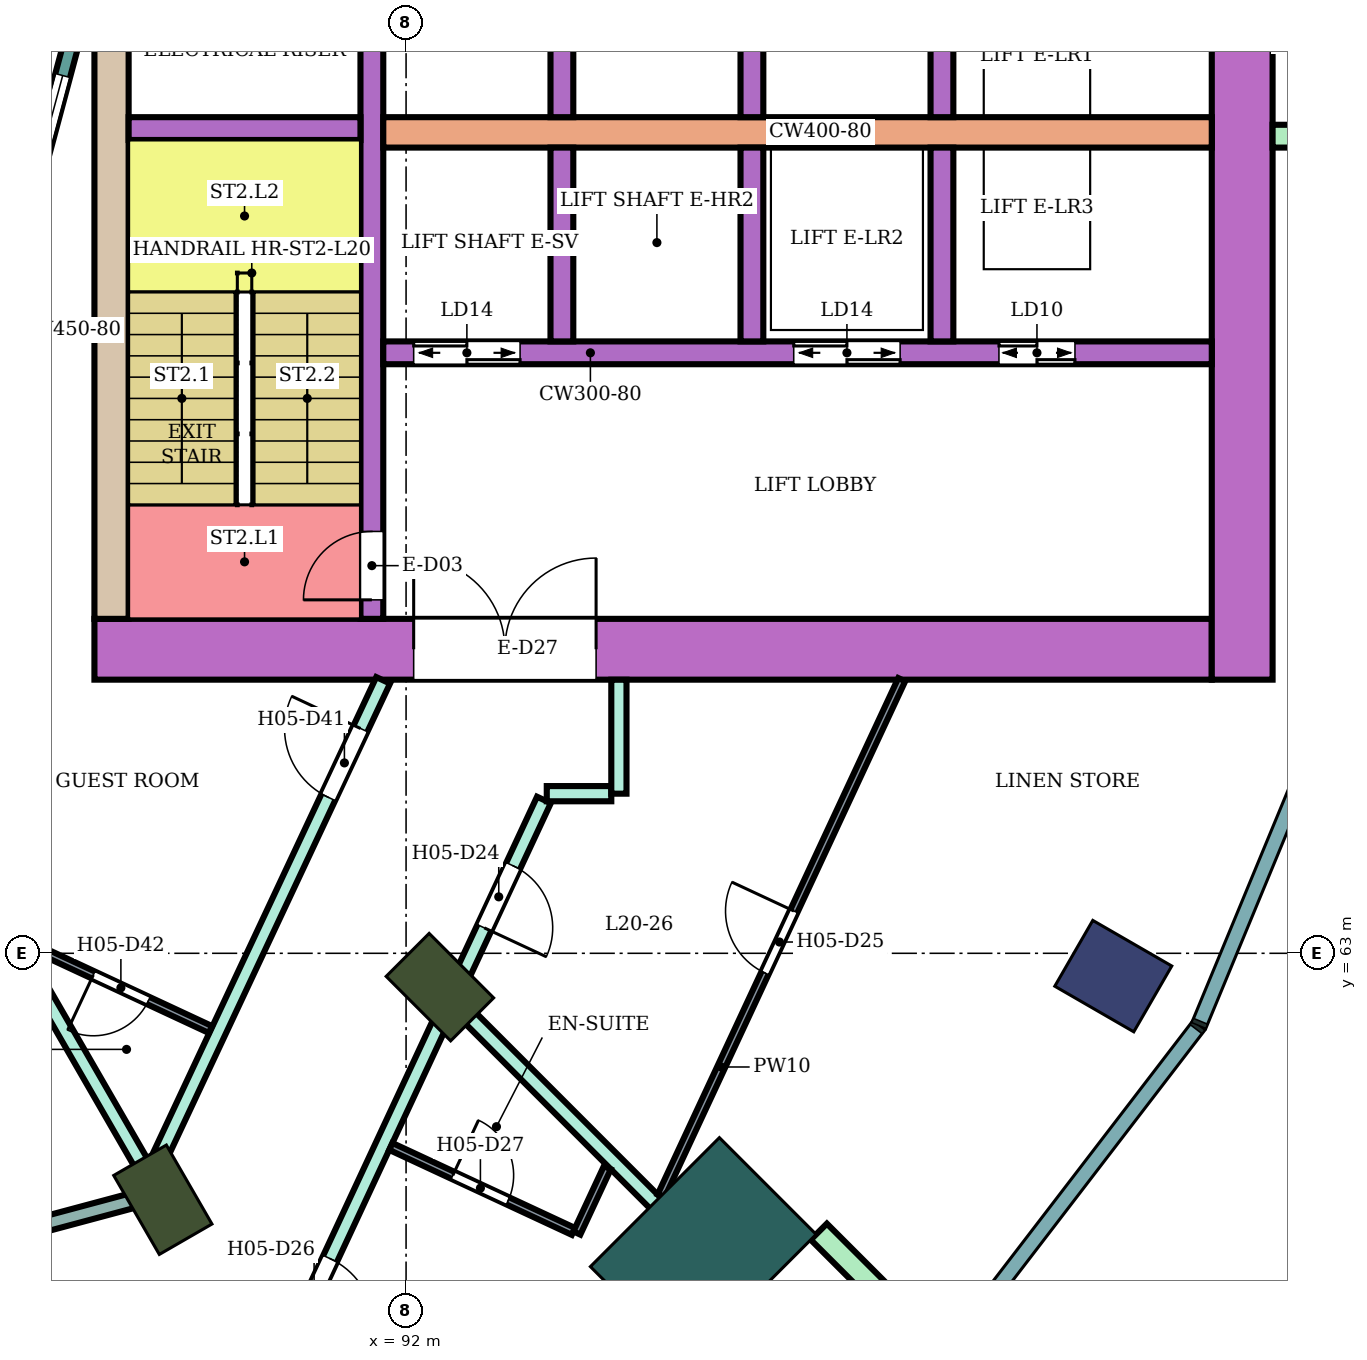
"""IFC4 building model, lengths in metres.
Left out: names, types, materials, properties, quantities, classifications, styles, units other than length and angle.
Written with IfcOpenShell. Run it as: python <this file> out.ifc"""

import sys

from ifc_helpers import new_model, si_unit, direction, frame, frame_2d, origin, origin_2d, place, context, subcontext, project, spatial, rectangle, extrude, element, fill, save


model = new_model("IFC4")
c1 = context("Model", 3, precision=1e-05, world=origin(), true_north=direction((0.0, 1.0)))
c2 = subcontext(c1, "Body", "Model", "MODEL_VIEW")
j1 = project(units=[si_unit("LENGTHUNIT", "METRE"), si_unit("PLANEANGLEUNIT", "RADIAN")], contexts=[c1])
p1 = place(None, origin())
s1 = spatial("IfcSite", under=j1, at=p1, CompositionType="ELEMENT")
p2 = place(p1, origin())
s2 = spatial("IfcBuilding", under=s1, at=p2, CompositionType="ELEMENT")
p3 = place(p2, frame((0.0, 0.0, 90.0)))
s3 = spatial("IfcBuildingStorey", under=s2, at=p3, CompositionType="ELEMENT", Elevation=90.0)
p4 = place(p3, frame((101.304, 62.7, 0.0), z_axis=(0.0, 0.0, 1.0), x_axis=(0.866025403784, -0.5, 0.0)))
e1 = element("IfcColumn", 1, at=p4, inside=s3, PredefinedType="COLUMN", context=c2, shape_type="SweptSolid", body=[
    extrude(rectangle(XDim=1.2, YDim=1.0, at=origin_2d()), origin(), (0.0, 0.0, 1.0), 3.8),
])
for number, where, z_axis, x_axis in (
    (2, (88.8, 59.758, 0.0), (0.0, 0.0, 1.0), (0.5, -0.866, 0.0)),
    (3, (92.445, 62.555, 0.0), (0.0, 0.0, 1.0), (0.707, -0.707, 0.0)),
):
    element("IfcColumn", number, at=place(p3, frame(where, z_axis=z_axis, x_axis=x_axis)), inside=s3, PredefinedType="COLUMN", context=c2, shape_type="SweptSolid", body=[
        extrude(rectangle(XDim=1.2, YDim=0.8, at=origin_2d()), origin(), (0.0, 0.0, 1.0), 3.8),
    ])
p5 = place(p3, frame((95.91, 59.09, 0.0), z_axis=(0.0, 0.0, 1.0), x_axis=(0.707106781187, -0.707106781187, 0.0)))
e4 = element("IfcColumn", 4, at=p5, inside=s3, PredefinedType="COLUMN", context=c2, shape_type="SweptSolid", body=[
    extrude(rectangle(XDim=1.8, YDim=2.4, at=origin_2d()), origin(), (0.0, 0.0, 1.0), 3.8),
])
p6 = place(p3, frame((87.9, 67.0, 0.0), z_axis=(0.0, 0.0, 1.0), x_axis=(1.0, 0.0, 0.0)))
e5 = element("IfcWall", 5, at=p6, inside=s3, PredefinedType="SHEAR", context=c2, shape_type="SweptSolid", body=[
    extrude(rectangle(XDim=14.7, YDim=0.8, at=frame_2d((7.35, 0.0))), origin(), (0.0, 0.0, 1.0), 3.48),
])
p7 = place(p6, frame((4.2, 0.0, 0.0)))
e6 = element("IfcOpeningElement", 6, at=p7, cuts=e5, PredefinedType="OPENING", context=c2, shape_type="SweptSolid", body=[
    extrude(rectangle(XDim=2.4, YDim=2.4, at=frame_2d((1.2, 1.2))), frame((0.0, 0.41, 0.0), z_axis=(0.0, -1.0, 0.0), x_axis=(1.0, 0.0, 0.0)), (0.0, 0.0, 1.0), 0.82),
])
p8 = place(p3, frame((88.125, 67.4, 0.0), z_axis=(0.0, 0.0, 1.0), x_axis=(0.0, 1.0, 0.0)))
e7 = element("IfcWall", 7, at=p8, inside=s3, PredefinedType="SHEAR", context=c2, shape_type="SweptSolid", body=[
    extrude(rectangle(XDim=7.6, YDim=0.45, at=frame_2d((3.8, 0.0))), origin(), (0.0, 0.0, 1.0), 3.48),
])
p9 = place(p3, frame((103.0, 66.6, 0.0), z_axis=(0.0, 0.0, 1.0), x_axis=(0.0, 1.0, 0.0)))
e8 = element("IfcWall", 8, at=p9, inside=s3, PredefinedType="SHEAR", context=c2, shape_type="SweptSolid", body=[
    extrude(rectangle(XDim=16.8, YDim=0.8, at=frame_2d((8.4, 0.0))), origin(), (0.0, 0.0, 1.0), 3.48),
])
p10 = place(p3, frame((91.55, 67.4, 0.0), z_axis=(0.0, 0.0, 1.0), x_axis=(0.0, 1.0, 0.0)))
e9 = element("IfcWall", 9, at=p10, inside=s3, PredefinedType="SHEAR", context=c2, shape_type="SweptSolid", body=[
    extrude(rectangle(XDim=7.6, YDim=0.3, at=frame_2d((3.8, 0.0))), origin(), (0.0, 0.0, 1.0), 3.48),
])
p11 = place(p10, frame((0.25, 0.0, 0.0)))
e10 = element("IfcOpeningElement", 10, at=p11, cuts=e9, PredefinedType="OPENING", context=c2, shape_type="SweptSolid", body=[
    extrude(rectangle(XDim=0.9, YDim=2.1, at=frame_2d((0.45, 1.05))), frame((0.0, 0.16, 0.0), z_axis=(0.0, -1.0, 0.0), x_axis=(1.0, 0.0, 0.0)), (0.0, 0.0, 1.0), 0.32),
])
p12 = place(p3, frame((88.35, 73.85, 0.0), z_axis=(0.0, 0.0, 1.0), x_axis=(1.0, 0.0, 0.0)))
e11 = element("IfcWall", 11, at=p12, inside=s3, PredefinedType="SHEAR", context=c2, shape_type="SweptSolid", body=[
    extrude(rectangle(XDim=3.05, YDim=0.3, at=frame_2d((1.525, 0.0))), origin(), (0.0, 0.0, 1.0), 3.48),
])
p13 = place(p3, frame((91.7, 73.8, 0.0), z_axis=(0.0, 0.0, 1.0), x_axis=(1.0, 0.0, 0.0)))
e12 = element("IfcWall", 12, at=p13, inside=s3, PredefinedType="SHEAR", context=c2, shape_type="SweptSolid", body=[
    extrude(rectangle(XDim=10.9, YDim=0.4, at=frame_2d((5.45, 0.0))), origin(), (0.0, 0.0, 1.0), 3.48),
])
p14 = place(p3, frame((91.7, 70.9, 0.0), z_axis=(0.0, 0.0, 1.0), x_axis=(1.0, 0.0, 0.0)))
e13 = element("IfcWall", 13, at=p14, inside=s3, PredefinedType="SHEAR", context=c2, shape_type="SweptSolid", body=[
    extrude(rectangle(XDim=10.9, YDim=0.3, at=frame_2d((5.45, 0.0))), origin(), (0.0, 0.0, 1.0), 3.48),
])
p15 = place(p14, frame((0.4, 0.0, 0.0)))
e14 = element("IfcOpeningElement", 14, at=p15, cuts=e13, PredefinedType="OPENING", context=c2, shape_type="SweptSolid", body=[
    extrude(rectangle(XDim=1.4, YDim=2.1, at=frame_2d((0.7, 1.05))), frame((0.0, 0.16, 0.0), z_axis=(0.0, -1.0, 0.0), x_axis=(1.0, 0.0, 0.0)), (0.0, 0.0, 1.0), 0.32),
])
p16 = place(p14, frame((5.4, 0.0, 0.0)))
e15 = element("IfcOpeningElement", 15, at=p16, cuts=e13, PredefinedType="OPENING", context=c2, shape_type="SweptSolid", body=[
    extrude(rectangle(XDim=1.4, YDim=2.1, at=frame_2d((0.7, 1.05))), frame((0.0, 0.16, 0.0), z_axis=(0.0, -1.0, 0.0), x_axis=(1.0, 0.0, 0.0)), (0.0, 0.0, 1.0), 0.32),
])
p17 = place(p14, frame((8.1, 0.0, 0.0)))
e16 = element("IfcOpeningElement", 16, at=p17, cuts=e13, PredefinedType="OPENING", context=c2, shape_type="SweptSolid", body=[
    extrude(rectangle(XDim=1.0, YDim=2.1, at=frame_2d((0.5, 1.05))), frame((0.0, 0.16, 0.0), z_axis=(0.0, -1.0, 0.0), x_axis=(1.0, 0.0, 0.0)), (0.0, 0.0, 1.0), 0.32),
])
for number, where, z_axis, x_axis in (
    (17, (94.05, 74.0, 0.0), (0.0, 0.0, 1.0), (0.0, 1.0, 0.0)),
    (18, (96.55, 74.0, 0.0), (0.0, 0.0, 1.0), (0.0, 1.0, 0.0)),
    (19, (99.05, 74.0, 0.0), (0.0, 0.0, 1.0), (0.0, 1.0, 0.0)),
    (20, (94.05, 71.05, 0.0), (0.0, 0.0, 1.0), (0.0, 1.0, 0.0)),
    (21, (96.55, 71.05, 0.0), (0.0, 0.0, 1.0), (0.0, 1.0, 0.0)),
    (22, (99.05, 71.05, 0.0), (0.0, 0.0, 1.0), (0.0, 1.0, 0.0)),
):
    element("IfcWall", number, at=place(p3, frame(where, z_axis=z_axis, x_axis=x_axis)), inside=s3, PredefinedType="SHEAR", context=c2, shape_type="SweptSolid", body=[
        extrude(rectangle(XDim=2.55, YDim=0.3, at=frame_2d((1.275, 0.0))), origin(), (0.0, 0.0, 1.0), 3.48),
    ])
for number, where, z_axis, x_axis in (
    (23, (103.4, 73.75, 0.0), (0.0, 0.0, 1.0), (1.0, 0.0, 0.0)),
    (24, (97.43, 59.338, 0.0), (0.0, 0.0, 1.0), (0.707, -0.707, 0.0)),
):
    element("IfcWall", number, at=place(p3, frame(where, z_axis=z_axis, x_axis=x_axis)), inside=s3, PredefinedType="NOTDEFINED", context=c2, shape_type="SweptSolid", body=[
        extrude(rectangle(XDim=2.416, YDim=0.3, at=frame_2d((1.208, 0.0))), origin(), (0.0, 0.0, 1.0), 3.8),
    ])
p18 = place(p3, frame((86.585, 71.198, 0.0), z_axis=(0.0, 0.0, 1.0), x_axis=(0.258789828301, 0.965933654434, 0.0)))
e25 = element("IfcWall", 25, at=p18, inside=s3, PredefinedType="NOTDEFINED", context=c2, shape_type="SweptSolid", body=[
    extrude(rectangle(XDim=3.936, YDim=0.2, at=frame_2d((1.968, 0.0))), origin(), (0.0, 0.0, 1.0), 3.8),
])
p19 = place(p18, frame((0.468, 0.0, 0.9)))
e26 = element("IfcOpeningElement", 26, at=p19, cuts=e25, PredefinedType="OPENING", context=c2, shape_type="SweptSolid", body=[
    extrude(rectangle(XDim=3.0, YDim=2.3, at=frame_2d((1.5, 1.15))), frame((0.0, 0.11, 0.0), z_axis=(0.0, -1.0, 0.0), x_axis=(1.0, 0.0, 0.0)), (0.0, 0.0, 1.0), 0.22),
])
p20 = place(p3, frame((80.0, 57.496, 0.0), z_axis=(0.0, 0.0, 1.0), x_axis=(0.96592471314, 0.258823199396, 0.0)))
e27 = element("IfcWall", 27, at=p20, inside=s3, PredefinedType="PARTITIONING", context=c2, shape_type="SweptSolid", body=[
    extrude(rectangle(XDim=8.732, YDim=0.2, at=frame_2d((4.366, 0.0))), origin(), (0.0, 0.0, 1.0), 2.98),
])
p21 = place(p3, frame((83.846, 68.33, 0.0), z_axis=(0.0, 0.0, 1.0), x_axis=(0.499822319857, -0.866127963163, 0.0)))
e28 = element("IfcWall", 28, at=p21, inside=s3, PredefinedType="PARTITIONING", context=c2, shape_type="SweptSolid", body=[
    extrude(rectangle(XDim=9.382, YDim=0.2, at=frame_2d((4.691, 0.0))), origin(), (0.0, 0.0, 1.0), 3.35),
])
p22 = place(p3, frame((88.501, 59.775, 0.0), z_axis=(0.0, 0.0, 1.0), x_axis=(0.424700525505, 0.905333896215, 0.0)))
e29 = element("IfcWall", 29, at=p22, inside=s3, PredefinedType="PARTITIONING", context=c2, shape_type="SweptSolid", body=[
    extrude(rectangle(XDim=7.53, YDim=0.2, at=frame_2d((3.765, 0.0))), origin(), (0.0, 0.0, 1.0), 3.35),
])
p23 = place(p22, frame((5.83, 0.0, 0.0)))
e30 = element("IfcOpeningElement", 30, at=p23, cuts=e29, PredefinedType="OPENING", context=c2, shape_type="SweptSolid", body=[
    extrude(rectangle(XDim=1.0, YDim=2.1, at=frame_2d((0.5, 1.05))), frame((0.0, 0.11, 0.0), z_axis=(0.0, -1.0, 0.0), x_axis=(1.0, 0.0, 0.0)), (0.0, 0.0, 1.0), 0.22),
])
p24 = place(p3, frame((90.346, 57.578, 0.0), z_axis=(0.0, 0.0, 1.0), x_axis=(0.422403412327, 0.906407941964, 0.0)))
e31 = element("IfcWall", 31, at=p24, inside=s3, PredefinedType="PARTITIONING", context=c2, shape_type="SweptSolid", body=[
    extrude(rectangle(XDim=8.208, YDim=0.2, at=frame_2d((4.104, 0.0))), origin(), (0.0, 0.0, 1.0), 3.35),
])
p25 = place(p24, frame((6.351, 0.0, 0.0)))
e32 = element("IfcOpeningElement", 32, at=p25, cuts=e31, PredefinedType="OPENING", context=c2, shape_type="SweptSolid", body=[
    extrude(rectangle(XDim=0.9, YDim=2.1, at=frame_2d((0.45, 1.05))), frame((0.0, 0.11, 0.0), z_axis=(0.0, -1.0, 0.0), x_axis=(1.0, 0.0, 0.0)), (0.0, 0.0, 1.0), 0.22),
])
p26 = place(p24, frame((0.55, 0.0, 0.0)))
e33 = element("IfcOpeningElement", 33, at=p26, cuts=e31, PredefinedType="OPENING", context=c2, shape_type="SweptSolid", body=[
    extrude(rectangle(XDim=1.0, YDim=2.1, at=frame_2d((0.5, 1.05))), frame((0.0, 0.11, 0.0), z_axis=(0.0, -1.0, 0.0), x_axis=(1.0, 0.0, 0.0)), (0.0, 0.0, 1.0), 0.22),
])
p27 = place(p3, frame((92.692, 62.303, 0.0), z_axis=(0.0, 0.0, 1.0), x_axis=(0.706920663731, -0.707292849667, 0.0)))
e34 = element("IfcWall", 34, at=p27, inside=s3, PredefinedType="PARTITIONING", context=c2, shape_type="SweptSolid", body=[
    extrude(rectangle(XDim=5.248, YDim=0.2, at=frame_2d((2.624, 0.0))), origin(), (0.0, 0.0, 1.0), 3.35),
])
p28 = place(p3, frame((93.851, 65.1, 0.0), z_axis=(0.0, 0.0, 1.0), x_axis=(1.0, 0.0, 0.0)))
e35 = element("IfcWall", 35, at=p28, inside=s3, PredefinedType="PARTITIONING", context=c2, shape_type="SweptSolid", body=[
    extrude(rectangle(XDim=0.849, YDim=0.2, at=frame_2d((0.424, 0.0))), origin(), (0.0, 0.0, 1.0), 3.35),
])
p29 = place(p3, frame((94.8, 65.1, 0.0), z_axis=(0.0, 0.0, 1.0), x_axis=(0.0, 1.0, 0.0)))
e36 = element("IfcWall", 36, at=p29, inside=s3, PredefinedType="PARTITIONING", context=c2, shape_type="SweptSolid", body=[
    extrude(rectangle(XDim=1.499, YDim=0.2, at=frame_2d((0.75, 0.0))), origin(), (0.0, 0.0, 1.0), 3.35),
])
p30 = place(p3, frame((87.006, 63.124, 0.0), z_axis=(0.0, 0.0, 1.0), x_axis=(0.906535604863, -0.422129360642, 0.0)))
e37 = element("IfcWall", 37, at=p30, inside=s3, PredefinedType="PARTITIONING", context=c2, shape_type="SweptSolid", body=[
    extrude(rectangle(XDim=2.67, YDim=0.1, at=frame_2d((1.335, 0.0))), origin(), (0.0, 0.0, 1.0), 3.35),
])
p31 = place(p30, frame((0.97, 0.0, 0.0)))
e38 = element("IfcOpeningElement", 38, at=p31, cuts=e37, PredefinedType="OPENING", context=c2, shape_type="SweptSolid", body=[
    extrude(rectangle(XDim=0.8, YDim=2.1, at=frame_2d((0.4, 1.05))), frame((0.0, 0.06, 0.0), z_axis=(0.0, -1.0, 0.0), x_axis=(1.0, 0.0, 0.0)), (0.0, 0.0, 1.0), 0.12),
])
p32 = place(p3, frame((91.8, 60.459, 0.0), z_axis=(0.0, 0.0, 1.0), x_axis=(0.906644059932, -0.421896371861, 0.0)))
e39 = element("IfcWall", 39, at=p32, inside=s3, PredefinedType="PARTITIONING", context=c2, shape_type="SweptSolid", body=[
    extrude(rectangle(XDim=2.649, YDim=0.1, at=frame_2d((1.325, 0.0))), origin(), (0.0, 0.0, 1.0), 3.35),
])
p33 = place(p32, frame((0.899, 0.0, 0.0)))
e40 = element("IfcOpeningElement", 40, at=p33, cuts=e39, PredefinedType="OPENING", context=c2, shape_type="SweptSolid", body=[
    extrude(rectangle(XDim=0.8, YDim=2.1, at=frame_2d((0.4, 1.05))), frame((0.0, 0.06, 0.0), z_axis=(0.0, -1.0, 0.0), x_axis=(1.0, 0.0, 0.0)), (0.0, 0.0, 1.0), 0.12),
])
p34 = place(p3, frame((94.247, 59.32, 0.0), z_axis=(0.0, 0.0, 1.0), x_axis=(0.422660124657, 0.906288264861, 0.0)))
e41 = element("IfcWall", 41, at=p34, inside=s3, PredefinedType="PARTITIONING", context=c2, shape_type="SweptSolid", body=[
    extrude(rectangle(XDim=0.949, YDim=0.1, at=frame_2d((0.475, 0.0))), origin(), (0.0, 0.0, 1.0), 3.35),
])
p35 = place(p3, frame((95.355, 59.806, 0.0), z_axis=(0.0, 0.0, 1.0), x_axis=(0.422407546544, 0.906406015328, 0.0)))
e42 = element("IfcWall", 42, at=p35, inside=s3, PredefinedType="PARTITIONING", context=c2, shape_type="SweptSolid", body=[
    extrude(rectangle(XDim=7.496, YDim=0.1, at=frame_2d((3.748, 0.0))), origin(), (0.0, 0.0, 1.0), 3.35),
])
p36 = place(p35, frame((3.238, 0.0, 0.0)))
e43 = element("IfcOpeningElement", 43, at=p36, cuts=e42, PredefinedType="OPENING", context=c2, shape_type="SweptSolid", body=[
    extrude(rectangle(XDim=0.9, YDim=2.1, at=frame_2d((0.45, 1.05))), frame((0.0, 0.06, 0.0), z_axis=(0.0, -1.0, 0.0), x_axis=(1.0, 0.0, 0.0)), (0.0, 0.0, 1.0), 0.12),
])
p37 = place(p19, origin())
e44 = element("IfcWindow", 44, at=p37, inside=s3, PartitioningType="SINGLE_PANEL", PredefinedType="WINDOW", context=c2, shape_type="SweptSolid", body=[
    extrude(rectangle(XDim=3.0, YDim=2.3, at=frame_2d((1.5, 1.15))), frame((0.0, 0.03, 0.0), z_axis=(0.0, -1.0, 0.0), x_axis=(1.0, 0.0, 0.0)), (0.0, 0.0, 1.0), 0.06),
])
fill(e26, e44)
p38 = place(p25, frame((0.9, 0.0, 0.0), z_axis=(0.0, 0.0, 1.0), x_axis=(-1.0, 0.0, 0.0)))
e45 = element("IfcDoor", 45, at=p38, inside=s3, OperationType="SINGLE_SWING_RIGHT", PredefinedType="DOOR", context=c2, shape_type="SweptSolid", body=[
    extrude(rectangle(XDim=0.9, YDim=2.1, at=frame_2d((0.45, 1.05))), frame((0.0, 0.025, 0.0), z_axis=(0.0, -1.0, 0.0), x_axis=(1.0, 0.0, 0.0)), (0.0, 0.0, 1.0), 0.05),
])
fill(e32, e45)
p39 = place(p36, origin())
e46 = element("IfcDoor", 46, at=p39, inside=s3, OperationType="SINGLE_SWING_RIGHT", PredefinedType="DOOR", context=c2, shape_type="SweptSolid", body=[
    extrude(rectangle(XDim=0.9, YDim=2.1, at=frame_2d((0.45, 1.05))), frame((0.0, 0.025, 0.0), z_axis=(0.0, -1.0, 0.0), x_axis=(1.0, 0.0, 0.0)), (0.0, 0.0, 1.0), 0.05),
])
fill(e43, e46)
p40 = place(p26, frame((1.0, 0.0, 0.0), z_axis=(0.0, 0.0, 1.0), x_axis=(-1.0, 0.0, 0.0)))
e47 = element("IfcDoor", 47, at=p40, inside=s3, OperationType="SINGLE_SWING_RIGHT", PredefinedType="DOOR", context=c2, shape_type="SweptSolid", body=[
    extrude(rectangle(XDim=1.0, YDim=2.1, at=frame_2d((0.5, 1.05))), frame((0.0, 0.025, 0.0), z_axis=(0.0, -1.0, 0.0), x_axis=(1.0, 0.0, 0.0)), (0.0, 0.0, 1.0), 0.05),
])
fill(e33, e47)
p41 = place(p33, origin())
e48 = element("IfcDoor", 48, at=p41, inside=s3, OperationType="SINGLE_SWING_LEFT", PredefinedType="DOOR", context=c2, shape_type="SweptSolid", body=[
    extrude(rectangle(XDim=0.8, YDim=2.1, at=frame_2d((0.4, 1.05))), frame((0.0, 0.025, 0.0), z_axis=(0.0, -1.0, 0.0), x_axis=(1.0, 0.0, 0.0)), (0.0, 0.0, 1.0), 0.05),
])
fill(e40, e48)
p42 = place(p23, origin())
e49 = element("IfcDoor", 49, at=p42, inside=s3, OperationType="SINGLE_SWING_RIGHT", PredefinedType="DOOR", context=c2, shape_type="SweptSolid", body=[
    extrude(rectangle(XDim=1.0, YDim=2.1, at=frame_2d((0.5, 1.05))), frame((0.0, 0.025, 0.0), z_axis=(0.0, -1.0, 0.0), x_axis=(1.0, 0.0, 0.0)), (0.0, 0.0, 1.0), 0.05),
])
fill(e30, e49)
p43 = place(p31, frame((0.8, 0.0, 0.0), z_axis=(0.0, 0.0, 1.0), x_axis=(-1.0, 0.0, 0.0)))
e50 = element("IfcDoor", 50, at=p43, inside=s3, OperationType="SINGLE_SWING_RIGHT", PredefinedType="DOOR", context=c2, shape_type="SweptSolid", body=[
    extrude(rectangle(XDim=0.8, YDim=2.1, at=frame_2d((0.4, 1.05))), frame((0.0, 0.025, 0.0), z_axis=(0.0, -1.0, 0.0), x_axis=(1.0, 0.0, 0.0)), (0.0, 0.0, 1.0), 0.05),
])
fill(e38, e50)
p44 = place(p11, origin())
e51 = element("IfcDoor", 51, at=p44, inside=s3, OperationType="SINGLE_SWING_LEFT", PredefinedType="DOOR", context=c2, shape_type="SweptSolid", body=[
    extrude(rectangle(XDim=0.9, YDim=2.1, at=frame_2d((0.45, 1.05))), frame((0.0, 0.025, 0.0), z_axis=(0.0, -1.0, 0.0), x_axis=(1.0, 0.0, 0.0)), (0.0, 0.0, 1.0), 0.05),
])
fill(e10, e51)
p45 = place(p15, origin())
e52 = element("IfcDoor", 52, at=p45, inside=s3, OperationType="DOUBLE_DOOR_SLIDING", PredefinedType="DOOR", context=c2, shape_type="SweptSolid", body=[
    extrude(rectangle(XDim=1.4, YDim=2.1, at=frame_2d((0.7, 1.05))), frame((0.0, 0.025, 0.0), z_axis=(0.0, -1.0, 0.0), x_axis=(1.0, 0.0, 0.0)), (0.0, 0.0, 1.0), 0.05),
])
fill(e14, e52)
p46 = place(p16, origin())
e53 = element("IfcDoor", 53, at=p46, inside=s3, OperationType="DOUBLE_DOOR_SLIDING", PredefinedType="DOOR", context=c2, shape_type="SweptSolid", body=[
    extrude(rectangle(XDim=1.4, YDim=2.1, at=frame_2d((0.7, 1.05))), frame((0.0, 0.025, 0.0), z_axis=(0.0, -1.0, 0.0), x_axis=(1.0, 0.0, 0.0)), (0.0, 0.0, 1.0), 0.05),
])
fill(e15, e53)
p47 = place(p17, origin())
e54 = element("IfcDoor", 54, at=p47, inside=s3, OperationType="DOUBLE_DOOR_SLIDING", PredefinedType="DOOR", context=c2, shape_type="SweptSolid", body=[
    extrude(rectangle(XDim=1.0, YDim=2.1, at=frame_2d((0.5, 1.05))), frame((0.0, 0.025, 0.0), z_axis=(0.0, -1.0, 0.0), x_axis=(1.0, 0.0, 0.0)), (0.0, 0.0, 1.0), 0.05),
])
fill(e16, e54)
p48 = place(p7, origin())
e55 = element("IfcDoor", 55, at=p48, inside=s3, OperationType="DOUBLE_DOOR_SINGLE_SWING", PredefinedType="DOOR", context=c2, shape_type="SweptSolid", body=[
    extrude(rectangle(XDim=2.4, YDim=2.4, at=frame_2d((1.2, 1.2))), frame((0.0, 0.025, 0.0), z_axis=(0.0, -1.0, 0.0), x_axis=(1.0, 0.0, 0.0)), (0.0, 0.0, 1.0), 0.05),
])
fill(e6, e55)
save(model, sys.argv[1])
